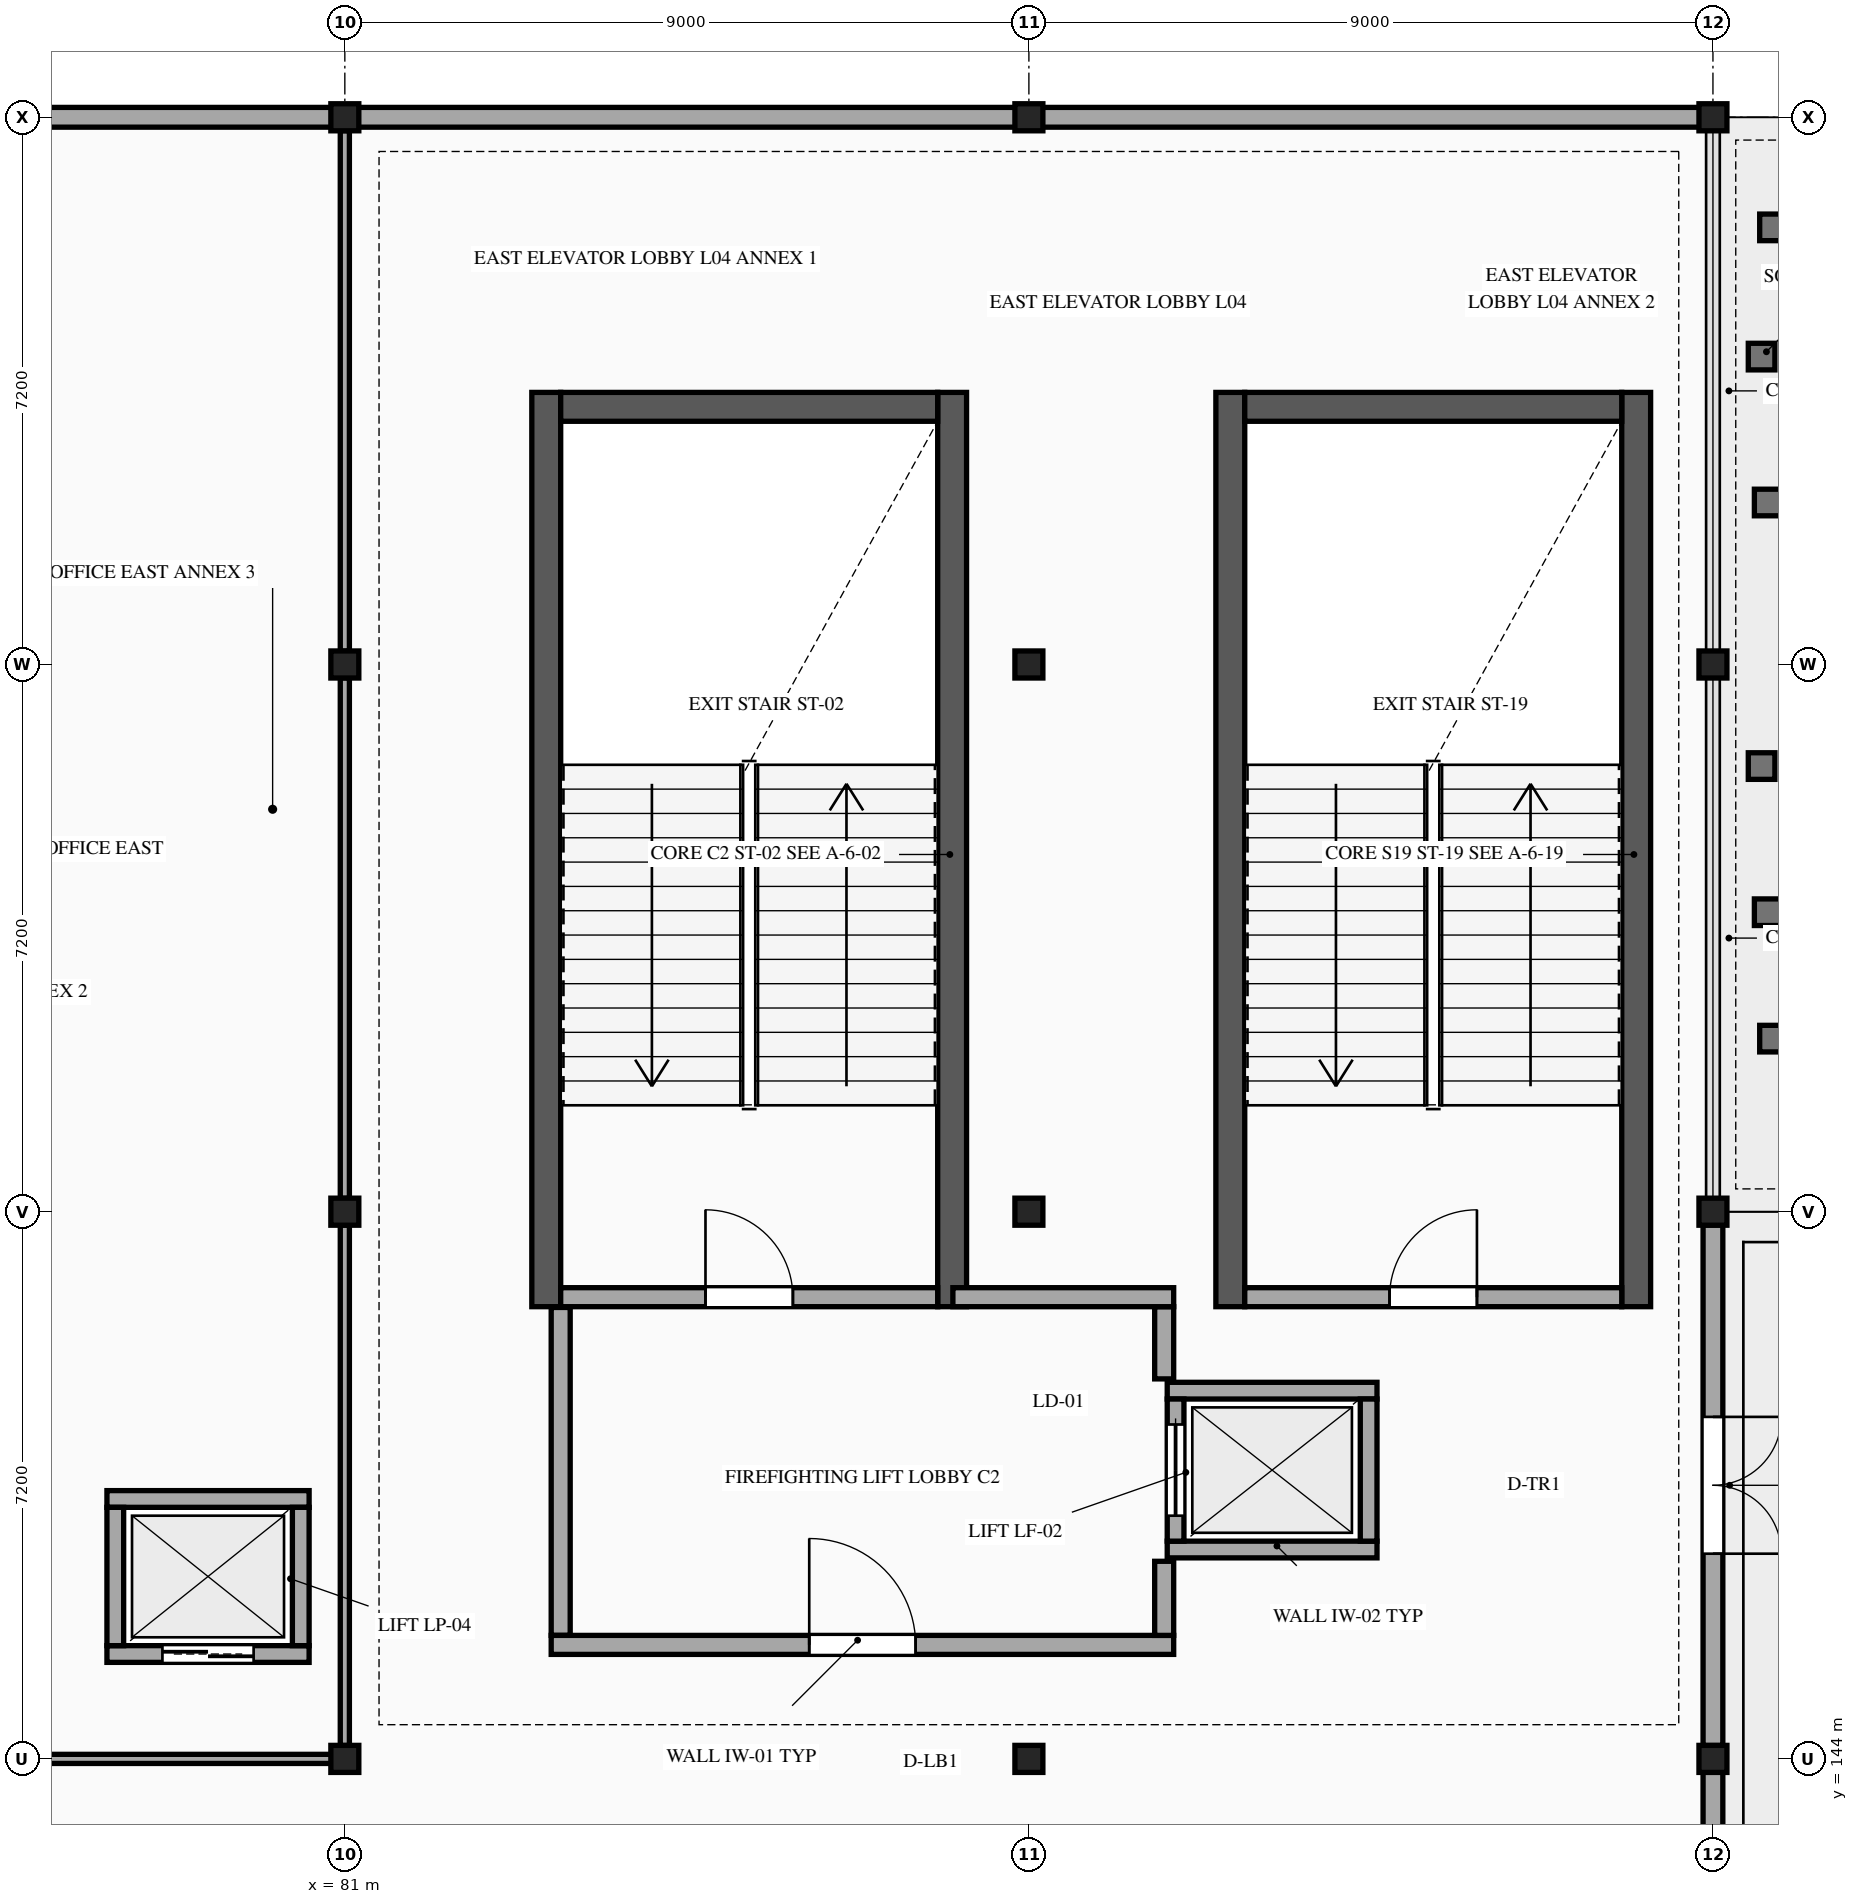
"""IFC4 building model, lengths in metres.
Left out: names, types, materials, properties, quantities, classifications, styles, units other than length and angle.
Written with IfcOpenShell. Run it as: python <this file> out.ifc"""

import sys

from ifc_helpers import new_model, si_unit, direction, frame, frame_2d, origin, origin_2d, place, context, subcontext, project, spatial, rectangle, i_section, extrude, element, fill, save


model = new_model("IFC4")
c1 = context("Model", 3, precision=1e-05, world=origin(), true_north=direction((0.0, 1.0)))
c2 = subcontext(c1, "Body", "Model", "MODEL_VIEW")
j1 = project(units=[si_unit("LENGTHUNIT", "METRE"), si_unit("PLANEANGLEUNIT", "RADIAN")], contexts=[c1])
p1 = place(None, origin())
s1 = spatial("IfcSite", under=j1, at=p1, CompositionType="ELEMENT")
p2 = place(p1, origin())
s2 = spatial("IfcBuilding", under=s1, at=p2, CompositionType="ELEMENT")
p3 = place(p2, frame((0.0, 0.0, 19.8)))
s3 = spatial("IfcBuildingStorey", under=s2, at=p3, CompositionType="ELEMENT", Elevation=19.8)
for number, where, z_axis, x_axis in (
    (1, (81.0, 144.0, 0.0), (0.0, 0.0, 1.0), (1.0, 0.0, 0.0)),
    (2, (81.0, 151.2, 0.0), (0.0, 0.0, 1.0), (1.0, 0.0, 0.0)),
    (3, (81.0, 158.4, 0.0), (0.0, 0.0, 1.0), (1.0, 0.0, 0.0)),
    (4, (81.0, 165.6, 0.0), (0.0, 0.0, 1.0), (1.0, 0.0, 0.0)),
    (5, (90.0, 144.0, 0.0), (0.0, 0.0, 1.0), (1.0, 0.0, 0.0)),
    (6, (90.0, 151.2, 0.0), (0.0, 0.0, 1.0), (1.0, 0.0, 0.0)),
    (7, (90.0, 158.4, 0.0), (0.0, 0.0, 1.0), (1.0, 0.0, 0.0)),
    (8, (90.0, 165.6, 0.0), (0.0, 0.0, 1.0), (1.0, 0.0, 0.0)),
    (9, (99.0, 144.0, 0.0), (0.0, 0.0, 1.0), (1.0, 0.0, 0.0)),
    (10, (99.0, 151.2, 0.0), (0.0, 0.0, 1.0), (1.0, 0.0, 0.0)),
    (11, (99.0, 158.4, 0.0), (0.0, 0.0, 1.0), (1.0, 0.0, 0.0)),
    (12, (99.0, 165.6, 0.0), (0.0, 0.0, 1.0), (1.0, 0.0, 0.0)),
):
    element("IfcColumn", number, at=place(p3, frame(where, z_axis=z_axis, x_axis=x_axis)), inside=s3, PredefinedType="COLUMN", context=c2, shape_type="SweptSolid", body=[
        extrude(i_section(OverallWidth=0.368, OverallDepth=0.356, WebThickness=0.011, FlangeThickness=0.018, at=origin_2d()), origin(), (0.0, 0.0, 1.0), 4.5),
    ])
for number, where, z_axis, x_axis in (
    (13, (83.65, 149.95, 0.0), (0.0, 0.0, 1.0), (0.0, 1.0, 0.0)),
    (14, (88.99, 161.98, 0.0), (0.0, 0.0, 1.0), (0.0, -1.0, 0.0)),
):
    element("IfcWall", number, at=place(p3, frame(where, z_axis=z_axis, x_axis=x_axis)), inside=s3, PredefinedType="SHEAR", context=c2, shape_type="SweptSolid", body=[
        extrude(rectangle(XDim=12.03, YDim=0.38, at=frame_2d((6.015, 0.0))), origin(), (0.0, 0.0, 1.0), 4.26),
    ])
p4 = place(p3, frame((83.84, 161.79, 0.0), z_axis=(0.0, 0.0, 1.0), x_axis=(1.0, 0.0, 0.0)))
e15 = element("IfcWall", 15, at=p4, inside=s3, PredefinedType="SHEAR", context=c2, shape_type="SweptSolid", body=[
    extrude(rectangle(XDim=4.96, YDim=0.38, at=frame_2d((2.48, 0.0))), origin(), (0.0, 0.0, 1.0), 4.26),
])
for number, where, z_axis, x_axis in (
    (16, (92.65, 149.95, 0.0), (0.0, 0.0, 1.0), (0.0, 1.0, 0.0)),
    (17, (97.99, 161.98, 0.0), (0.0, 0.0, 1.0), (0.0, -1.0, 0.0)),
):
    element("IfcWall", number, at=place(p3, frame(where, z_axis=z_axis, x_axis=x_axis)), inside=s3, PredefinedType="SHEAR", context=c2, shape_type="SweptSolid", body=[
        extrude(rectangle(XDim=12.03, YDim=0.38, at=frame_2d((6.015, 0.0))), origin(), (0.0, 0.0, 1.0), 4.26),
    ])
p5 = place(p3, frame((92.84, 161.79, 0.0), z_axis=(0.0, 0.0, 1.0), x_axis=(1.0, 0.0, 0.0)))
e18 = element("IfcWall", 18, at=p5, inside=s3, PredefinedType="SHEAR", context=c2, shape_type="SweptSolid", body=[
    extrude(rectangle(XDim=4.96, YDim=0.38, at=frame_2d((2.48, 0.0))), origin(), (0.0, 0.0, 1.0), 4.26),
])
for number, where, z_axis, x_axis in (
    (19, (72.005, 165.6, 0.0), (0.0, 0.0, 1.0), (1.0, 0.0, 0.0)),
    (20, (81.005, 165.6, 0.0), (0.0, 0.0, 1.0), (1.0, 0.0, 0.0)),
    (21, (90.005, 165.6, 0.0), (0.0, 0.0, 1.0), (1.0, 0.0, 0.0)),
):
    element("IfcWall", number, at=place(p3, frame(where, z_axis=z_axis, x_axis=x_axis)), inside=s3, PredefinedType="STANDARD", context=c2, shape_type="SweptSolid", body=[
        extrude(rectangle(XDim=8.99, YDim=0.26, at=frame_2d((4.495, 0.0))), origin(), (0.0, 0.0, 1.0), 3.648),
    ])
p6 = place(p3, frame((99.0, 151.024, 0.0), z_axis=(0.0, 0.0, 1.0), x_axis=(0.0, -1.0, 0.0)))
e22 = element("IfcWall", 22, at=p6, inside=s3, PredefinedType="STANDARD", context=c2, shape_type="SweptSolid", body=[
    extrude(rectangle(XDim=6.848, YDim=0.26, at=frame_2d((3.424, 0.0))), origin(), (0.0, 0.0, 1.0), 3.648),
])
p7 = place(p6, frame((2.524, 0.0, 0.0)))
e23 = element("IfcOpeningElement", 23, at=p7, cuts=e22, PredefinedType="OPENING", context=c2, shape_type="SweptSolid", body=[
    extrude(rectangle(XDim=1.8, YDim=2.25, at=frame_2d((0.9, 1.125))), frame((0.0, 0.14, 0.0), z_axis=(0.0, -1.0, 0.0), x_axis=(1.0, 0.0, 0.0)), (0.0, 0.0, 1.0), 0.28),
])
p8 = place(p3, frame((99.0, 143.824, 0.0), z_axis=(0.0, 0.0, 1.0), x_axis=(0.0, -1.0, 0.0)))
e24 = element("IfcWall", 24, at=p8, inside=s3, PredefinedType="STANDARD", context=c2, shape_type="SweptSolid", body=[
    extrude(rectangle(XDim=6.848, YDim=0.26, at=frame_2d((3.424, 0.0))), origin(), (0.0, 0.0, 1.0), 3.648),
])
p9 = place(p8, frame((2.624, 0.0, 0.0)))
e25 = element("IfcOpeningElement", 25, at=p9, cuts=e24, PredefinedType="OPENING", context=c2, shape_type="SweptSolid", body=[
    extrude(rectangle(XDim=1.6, YDim=2.2, at=frame_2d((0.8, 1.1))), frame((0.0, 0.14, 0.0), z_axis=(0.0, -1.0, 0.0), x_axis=(1.0, 0.0, 0.0)), (0.0, 0.0, 1.0), 0.28),
])
p10 = place(p3, frame((83.84, 150.075, 0.0), z_axis=(0.0, 0.0, 1.0), x_axis=(1.0, 0.0, 0.0)))
e26 = element("IfcWall", 26, at=p10, inside=s3, PredefinedType="STANDARD", context=c2, shape_type="SweptSolid", body=[
    extrude(rectangle(XDim=4.96, YDim=0.25, at=frame_2d((2.48, 0.0))), origin(), (0.0, 0.0, 1.0), 4.25),
])
p11 = place(p10, frame((1.905, 0.0, 0.0)))
e27 = element("IfcOpeningElement", 27, at=p11, cuts=e26, PredefinedType="OPENING", context=c2, shape_type="SweptSolid", body=[
    extrude(rectangle(XDim=1.15, YDim=2.2, at=frame_2d((0.575, 1.1))), frame((0.0, 0.135, 0.0), z_axis=(0.0, -1.0, 0.0), x_axis=(1.0, 0.0, 0.0)), (0.0, 0.0, 1.0), 0.27),
])
for number, where, z_axis, x_axis in (
    (28, (91.82, 146.755, 0.0), (0.0, 0.0, 1.0), (1.0, 0.0, 0.0)),
    (29, (94.58, 148.845, 0.0), (0.0, 0.0, 1.0), (-1.0, 0.0, 0.0)),
):
    element("IfcWall", number, at=place(p3, frame(where, z_axis=z_axis, x_axis=x_axis)), inside=s3, PredefinedType="STANDARD", context=c2, shape_type="SweptSolid", body=[
        extrude(rectangle(XDim=2.76, YDim=0.22, at=frame_2d((1.38, 0.0))), origin(), (0.0, 0.0, 1.0), 4.25),
    ])
p12 = place(p3, frame((91.93, 148.735, 0.0), z_axis=(0.0, 0.0, 1.0), x_axis=(0.0, -1.0, 0.0)))
e30 = element("IfcWall", 30, at=p12, inside=s3, PredefinedType="STANDARD", context=c2, shape_type="SweptSolid", body=[
    extrude(rectangle(XDim=1.87, YDim=0.22, at=frame_2d((0.935, 0.0))), origin(), (0.0, 0.0, 1.0), 4.25),
])
p13 = place(p12, frame((0.335, 0.0, 0.0)))
e31 = element("IfcOpeningElement", 31, at=p13, cuts=e30, PredefinedType="OPENING", context=c2, shape_type="SweptSolid", body=[
    extrude(rectangle(XDim=1.2, YDim=2.2, at=frame_2d((0.6, 1.1))), frame((0.0, 0.12, 0.0), z_axis=(0.0, -1.0, 0.0), x_axis=(1.0, 0.0, 0.0)), (0.0, 0.0, 1.0), 0.24),
])
p14 = place(p3, frame((94.47, 146.865, 0.0), z_axis=(0.0, 0.0, 1.0), x_axis=(0.0, 1.0, 0.0)))
e32 = element("IfcWall", 32, at=p14, inside=s3, PredefinedType="STANDARD", context=c2, shape_type="SweptSolid", body=[
    extrude(rectangle(XDim=1.87, YDim=0.22, at=frame_2d((0.935, 0.0))), origin(), (0.0, 0.0, 1.0), 4.25),
])
p15 = place(p3, frame((77.87, 145.38, 0.0), z_axis=(0.0, 0.0, 1.0), x_axis=(1.0, 0.0, 0.0)))
e33 = element("IfcWall", 33, at=p15, inside=s3, PredefinedType="STANDARD", context=c2, shape_type="SweptSolid", body=[
    extrude(rectangle(XDim=2.66, YDim=0.22, at=frame_2d((1.33, 0.0))), origin(), (0.0, 0.0, 1.0), 4.25),
])
p16 = place(p15, frame((0.73, 0.0, 0.0)))
e34 = element("IfcOpeningElement", 34, at=p16, cuts=e33, PredefinedType="OPENING", context=c2, shape_type="SweptSolid", body=[
    extrude(rectangle(XDim=1.2, YDim=2.2, at=frame_2d((0.6, 1.1))), frame((0.0, 0.12, 0.0), z_axis=(0.0, -1.0, 0.0), x_axis=(1.0, 0.0, 0.0)), (0.0, 0.0, 1.0), 0.24),
])
p17 = place(p3, frame((80.53, 147.42, 0.0), z_axis=(0.0, 0.0, 1.0), x_axis=(-1.0, 0.0, 0.0)))
e35 = element("IfcWall", 35, at=p17, inside=s3, PredefinedType="STANDARD", context=c2, shape_type="SweptSolid", body=[
    extrude(rectangle(XDim=2.66, YDim=0.22, at=frame_2d((1.33, 0.0))), origin(), (0.0, 0.0, 1.0), 4.25),
])
for number, where, z_axis, x_axis in (
    (36, (77.98, 147.31, 0.0), (0.0, 0.0, 1.0), (0.0, -1.0, 0.0)),
    (37, (80.42, 145.49, 0.0), (0.0, 0.0, 1.0), (0.0, 1.0, 0.0)),
):
    element("IfcWall", number, at=place(p3, frame(where, z_axis=z_axis, x_axis=x_axis)), inside=s3, PredefinedType="STANDARD", context=c2, shape_type="SweptSolid", body=[
        extrude(rectangle(XDim=1.82, YDim=0.22, at=frame_2d((0.91, 0.0))), origin(), (0.0, 0.0, 1.0), 4.25),
    ])
p18 = place(p3, frame((92.84, 150.075, 0.0), z_axis=(0.0, 0.0, 1.0), x_axis=(1.0, 0.0, 0.0)))
e38 = element("IfcWall", 38, at=p18, inside=s3, PredefinedType="STANDARD", context=c2, shape_type="SweptSolid", body=[
    extrude(rectangle(XDim=4.96, YDim=0.25, at=frame_2d((2.48, 0.0))), origin(), (0.0, 0.0, 1.0), 4.25),
])
p19 = place(p18, frame((1.905, 0.0, 0.0)))
e39 = element("IfcOpeningElement", 39, at=p19, cuts=e38, PredefinedType="OPENING", context=c2, shape_type="SweptSolid", body=[
    extrude(rectangle(XDim=1.15, YDim=2.2, at=frame_2d((0.575, 1.1))), frame((0.0, 0.135, 0.0), z_axis=(0.0, -1.0, 0.0), x_axis=(1.0, 0.0, 0.0)), (0.0, 0.0, 1.0), 0.27),
])
p20 = place(p3, frame((83.84, 149.94, 0.0), z_axis=(0.0, 0.0, 1.0), x_axis=(0.0, -1.0, 0.0)))
e40 = element("IfcWall", 40, at=p20, inside=s3, PredefinedType="STANDARD", context=c2, shape_type="SweptSolid", body=[
    extrude(rectangle(XDim=4.315, YDim=0.25, at=frame_2d((2.157, 0.0))), origin(), (0.0, 0.0, 1.0), 3.648),
])
p21 = place(p3, frame((83.715, 145.5, 0.0), z_axis=(0.0, 0.0, 1.0), x_axis=(1.0, 0.0, 0.0)))
e41 = element("IfcWall", 41, at=p21, inside=s3, PredefinedType="STANDARD", context=c2, shape_type="SweptSolid", body=[
    extrude(rectangle(XDim=8.19, YDim=0.25, at=frame_2d((4.095, 0.0))), origin(), (0.0, 0.0, 1.0), 3.648),
])
p22 = place(p21, frame((3.395, 0.0, 0.0)))
e42 = element("IfcOpeningElement", 42, at=p22, cuts=e41, PredefinedType="OPENING", context=c2, shape_type="SweptSolid", body=[
    extrude(rectangle(XDim=1.4, YDim=2.2, at=frame_2d((0.7, 1.1))), frame((0.0, 0.135, 0.0), z_axis=(0.0, -1.0, 0.0), x_axis=(1.0, 0.0, 0.0)), (0.0, 0.0, 1.0), 0.27),
])
p23 = place(p3, frame((91.78, 145.625, 0.0), z_axis=(0.0, 0.0, 1.0), x_axis=(0.0, 1.0, 0.0)))
e43 = element("IfcWall", 43, at=p23, inside=s3, PredefinedType="STANDARD", context=c2, shape_type="SweptSolid", body=[
    extrude(rectangle(XDim=0.975, YDim=0.25, at=frame_2d((0.488, 0.0))), origin(), (0.0, 0.0, 1.0), 3.648),
])
p24 = place(p3, frame((91.78, 149.0, 0.0), z_axis=(0.0, 0.0, 1.0), x_axis=(0.0, 1.0, 0.0)))
e44 = element("IfcWall", 44, at=p24, inside=s3, PredefinedType="STANDARD", context=c2, shape_type="SweptSolid", body=[
    extrude(rectangle(XDim=0.95, YDim=0.25, at=frame_2d((0.475, 0.0))), origin(), (0.0, 0.0, 1.0), 3.648),
])
p25 = place(p3, frame((89.0, 150.075, 0.0), z_axis=(0.0, 0.0, 1.0), x_axis=(1.0, 0.0, 0.0)))
e45 = element("IfcWall", 45, at=p25, inside=s3, PredefinedType="STANDARD", context=c2, shape_type="SweptSolid", body=[
    extrude(rectangle(XDim=2.905, YDim=0.25, at=frame_2d((1.453, 0.0))), origin(), (0.0, 0.0, 1.0), 3.648),
])
p26 = place(p3, frame((76.5, 144.0, 0.0), z_axis=(0.0, 0.0, 1.0), x_axis=(1.0, 0.0, 0.0)))
e46 = element("IfcWall", 46, at=p26, inside=s3, PredefinedType="PARTITIONING", context=c2, shape_type="SweptSolid", body=[
    extrude(rectangle(XDim=4.495, YDim=0.12, at=frame_2d((2.248, 0.0))), origin(), (0.0, 0.0, 1.0), 3.648),
])
p27 = place(p3, frame((81.0, 144.176, 0.0), z_axis=(0.0, 0.0, 1.0), x_axis=(0.0, 1.0, 0.0)))
e47 = element("IfcWall", 47, at=p27, inside=s3, PredefinedType="PARTITIONING", context=c2, shape_type="SweptSolid", body=[
    extrude(rectangle(XDim=6.848, YDim=0.12, at=frame_2d((3.424, 0.0))), origin(), (0.0, 0.0, 1.0), 3.648),
])
for number, where, z_axis, x_axis in (
    (48, (81.0, 151.376, 0.0), (0.0, 0.0, 1.0), (0.0, 1.0, 0.0)),
    (49, (81.0, 158.576, 0.0), (0.0, 0.0, 1.0), (0.0, 1.0, 0.0)),
):
    element("IfcWall", number, at=place(p3, frame(where, z_axis=z_axis, x_axis=x_axis)), inside=s3, PredefinedType="PARTITIONING", context=c2, shape_type="SweptSolid", body=[
        extrude(rectangle(XDim=6.848, YDim=0.12, at=frame_2d((3.424, 0.0))), origin(), (0.0, 0.0, 1.0), 3.648),
    ])
p28 = place(p7, origin())
e50 = element("IfcDoor", 50, at=p28, inside=s3, OperationType="DOUBLE_DOOR_SINGLE_SWING", PredefinedType="DOOR", context=c2, shape_type="SweptSolid", body=[
    extrude(rectangle(XDim=1.8, YDim=2.25, at=frame_2d((0.9, 1.125))), frame((0.0, 0.025, 0.0), z_axis=(0.0, -1.0, 0.0), x_axis=(1.0, 0.0, 0.0)), (0.0, 0.0, 1.0), 0.05),
])
fill(e23, e50)
p29 = place(p11, origin())
e51 = element("IfcDoor", 51, at=p29, inside=s3, OperationType="SINGLE_SWING_LEFT", PredefinedType="DOOR", context=c2, shape_type="SweptSolid", body=[
    extrude(rectangle(XDim=1.15, YDim=2.2, at=frame_2d((0.575, 1.1))), frame((0.0, 0.025, 0.0), z_axis=(0.0, -1.0, 0.0), x_axis=(1.0, 0.0, 0.0)), (0.0, 0.0, 1.0), 0.05),
])
fill(e27, e51)
p30 = place(p13, origin())
e52 = element("IfcDoor", 52, at=p30, inside=s3, OperationType="DOUBLE_DOOR_SLIDING", PredefinedType="DOOR", context=c2, shape_type="SweptSolid", body=[
    extrude(rectangle(XDim=1.2, YDim=2.2, at=frame_2d((0.6, 1.1))), frame((0.0, 0.025, 0.0), z_axis=(0.0, -1.0, 0.0), x_axis=(1.0, 0.0, 0.0)), (0.0, 0.0, 1.0), 0.05),
])
fill(e31, e52)
p31 = place(p16, origin())
e53 = element("IfcDoor", 53, at=p31, inside=s3, OperationType="DOUBLE_DOOR_SLIDING", PredefinedType="DOOR", context=c2, shape_type="SweptSolid", body=[
    extrude(rectangle(XDim=1.2, YDim=2.2, at=frame_2d((0.6, 1.1))), frame((0.0, 0.025, 0.0), z_axis=(0.0, -1.0, 0.0), x_axis=(1.0, 0.0, 0.0)), (0.0, 0.0, 1.0), 0.05),
])
fill(e34, e53)
p32 = place(p19, origin())
e54 = element("IfcDoor", 54, at=p32, inside=s3, OperationType="SINGLE_SWING_RIGHT", PredefinedType="DOOR", context=c2, shape_type="SweptSolid", body=[
    extrude(rectangle(XDim=1.15, YDim=2.2, at=frame_2d((0.575, 1.1))), frame((0.0, 0.025, 0.0), z_axis=(0.0, -1.0, 0.0), x_axis=(1.0, 0.0, 0.0)), (0.0, 0.0, 1.0), 0.05),
])
fill(e39, e54)
p33 = place(p22, origin())
e55 = element("IfcDoor", 55, at=p33, inside=s3, OperationType="SINGLE_SWING_LEFT", PredefinedType="DOOR", context=c2, shape_type="SweptSolid", body=[
    extrude(rectangle(XDim=1.4, YDim=2.2, at=frame_2d((0.7, 1.1))), frame((0.0, 0.025, 0.0), z_axis=(0.0, -1.0, 0.0), x_axis=(1.0, 0.0, 0.0)), (0.0, 0.0, 1.0), 0.05),
])
fill(e42, e55)
save(model, sys.argv[1])
